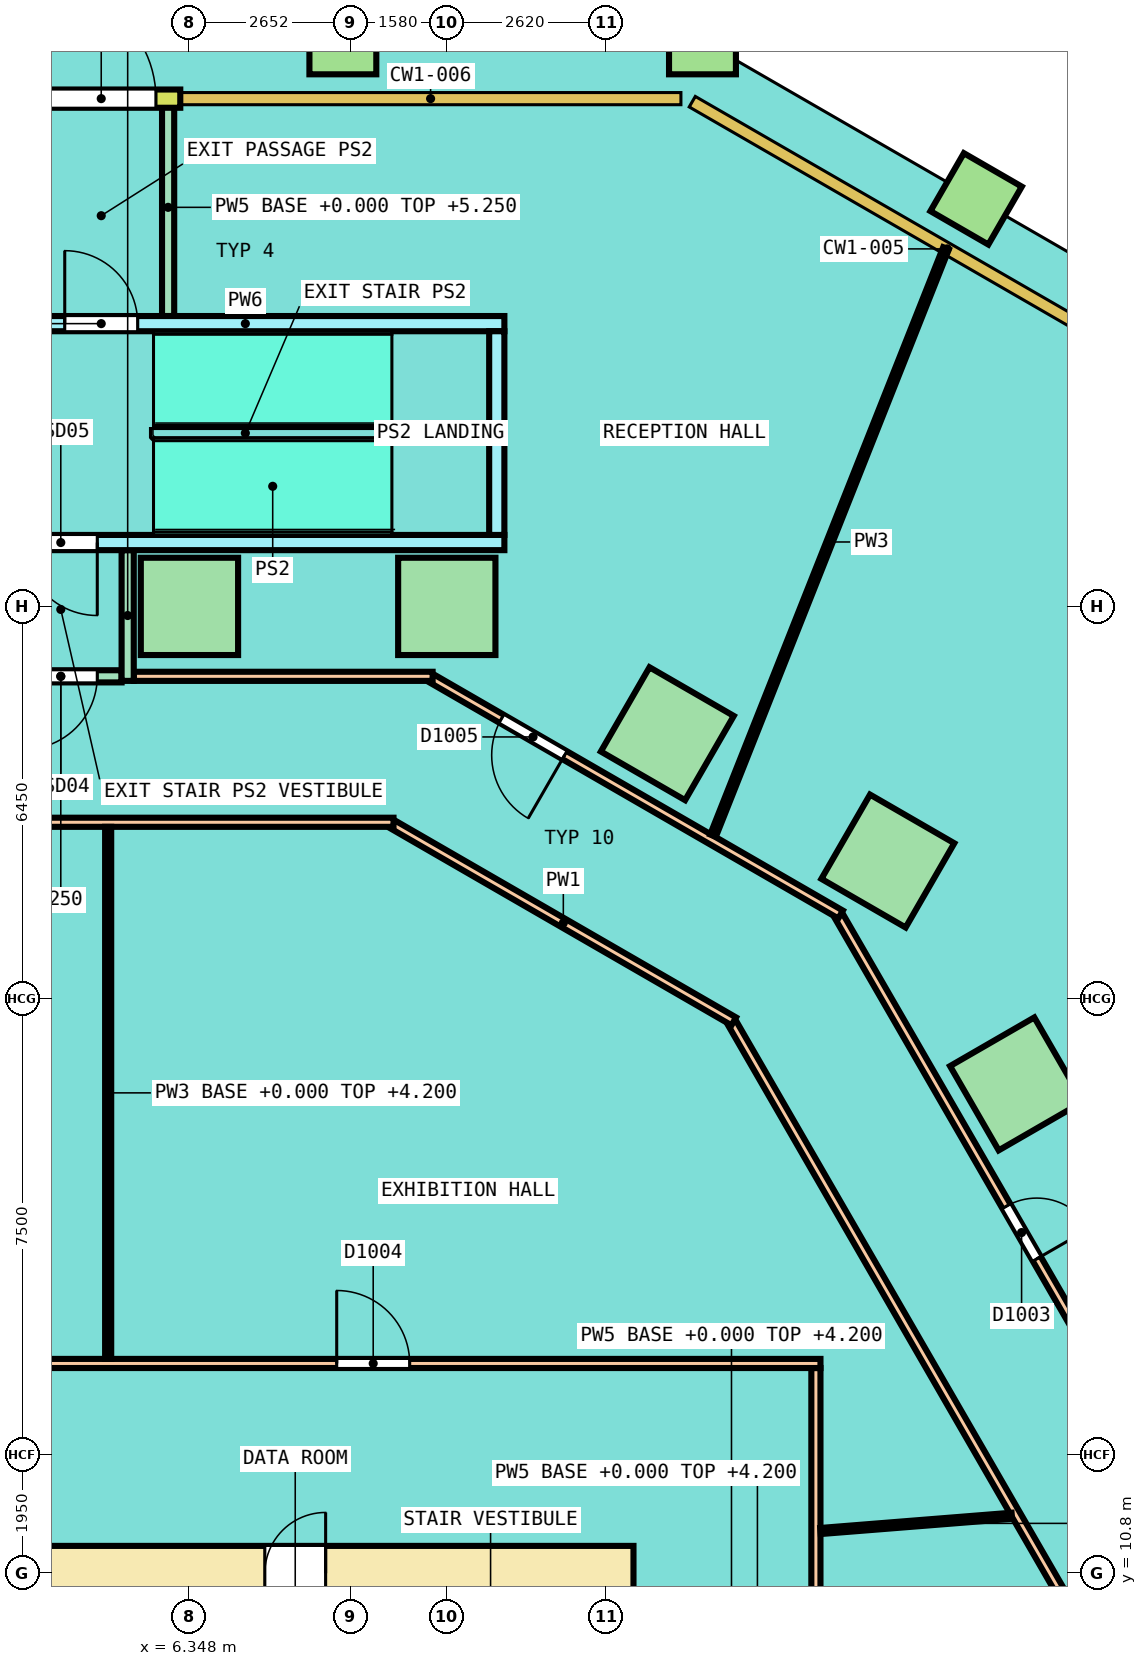
"""IFC4 building model, lengths in metres.
Left out: names, types, materials, properties, quantities, classifications, styles, units other than length and angle.
Written with IfcOpenShell. Run it as: python <this file> out.ifc"""

import sys

from ifc_helpers import new_model, si_unit, direction, frame, frame_2d, origin, origin_2d, place, context, subcontext, project, spatial, rectangle, extrude, element, fill, save


model = new_model("IFC4")
c1 = context("Model", 3, precision=1e-05, world=origin(), true_north=direction((0.0, 1.0)))
c2 = subcontext(c1, "Body", "Model", "MODEL_VIEW")
j1 = project(units=[si_unit("LENGTHUNIT", "METRE"), si_unit("PLANEANGLEUNIT", "RADIAN")], contexts=[c1])
p1 = place(None, origin())
s1 = spatial("IfcSite", under=j1, at=p1, CompositionType="ELEMENT")
p2 = place(p1, origin())
s2 = spatial("IfcBuilding", under=s1, at=p2, CompositionType="ELEMENT")
p3 = place(p2, origin())
s3 = spatial("IfcBuildingStorey", under=s2, at=p3, CompositionType="ELEMENT", Elevation=0.0)
for number, where, z_axis, x_axis in (
    (1, (19.949, 18.847, 0.0), (0.0, 0.0, 1.0), (-0.5, 0.866, 0.0)),
    (2, (17.833, 22.512, 0.0), (0.0, 0.0, 1.0), (-0.866, 0.5, 0.0)),
    (3, (14.206, 24.606, 0.0), (0.0, 0.0, 1.0), (-0.866, 0.5, 0.0)),
    (4, (10.58, 26.7, 0.0), (0.0, 0.0, 1.0), (-1.0, 0.0, 0.0)),
    (5, (6.348, 26.7, 0.0), (0.0, 0.0, 1.0), (-1.0, 0.0, 0.0)),
):
    element("IfcColumn", number, at=place(p3, frame(where, z_axis=z_axis, x_axis=x_axis)), inside=s3, PredefinedType="COLUMN", context=c2, shape_type="SweptSolid", body=[
        extrude(rectangle(XDim=1.6, YDim=1.6, at=origin_2d()), origin(), (0.0, 0.0, 1.0), 5.25),
    ])
for number, where, z_axis, x_axis in (
    (6, (19.285, 33.402, -0.35), (0.0, 0.0, 1.0), (-0.866, 0.5, 0.0)),
    (7, (14.785, 36.0, -0.35), (0.0, 0.0, 1.0), (-1.0, 0.0, 0.0)),
    (8, (8.871, 36.0, -0.35), (0.0, 0.0, 1.0), (-1.0, 0.0, 0.0)),
):
    element("IfcColumn", number, at=place(p3, frame(where, z_axis=z_axis, x_axis=x_axis)), inside=s3, PredefinedType="COLUMN", context=c2, shape_type="SweptSolid", body=[
        extrude(rectangle(XDim=1.1, YDim=1.1, at=origin_2d()), origin(), (0.0, 0.0, 1.0), 5.6),
    ])
p4 = place(p3, frame((6.197, 35.05, 0.0), z_axis=(0.0, 0.0, 1.0), x_axis=(-1.0, 0.0, 0.0)))
e9 = element("IfcWall", 9, at=p4, inside=s3, PredefinedType="SOLIDWALL", context=c2, shape_type="SweptSolid", body=[
    extrude(rectangle(XDim=2.6, YDim=0.3, at=frame_2d((1.3, 0.0))), origin(), (0.0, 0.0, 1.0), 5.25),
])
p5 = place(p4, frame((2.2, 0.0, 0.0), z_axis=(0.0, 0.0, 1.0), x_axis=(-1.0, 0.0, 0.0)))
e10 = element("IfcOpeningElement", 10, at=p5, cuts=e9, PredefinedType="OPENING", context=c2, shape_type="SweptSolid", body=[
    extrude(rectangle(XDim=1.8, YDim=2.4, at=frame_2d((0.9, 1.2))), frame((0.0, 0.16, 0.0), z_axis=(0.0, -1.0, 0.0), x_axis=(1.0, 0.0, 0.0)), (0.0, 0.0, 1.0), 0.32),
])
p6 = place(p3, frame((-13.65, 10.8, 0.0), z_axis=(0.0, 0.0, 1.0), x_axis=(1.0, 0.0, 0.0)))
e11 = element("IfcWall", 11, at=p6, inside=s3, PredefinedType="SHEAR", context=c2, shape_type="SweptSolid", body=[
    extrude(rectangle(XDim=27.3, YDim=0.9, at=frame_2d((13.65, 0.0))), origin(), (0.0, 0.0, 1.0), 5.3),
])
p7 = place(p6, frame((1.892, 0.0, 0.0)))
e12 = element("IfcOpeningElement", 12, at=p7, cuts=e11, PredefinedType="OPENING", context=c2, shape_type="SweptSolid", body=[
    extrude(rectangle(XDim=1.0, YDim=2.1, at=frame_2d((0.5, 1.05))), frame((0.0, 0.46, 0.0), z_axis=(0.0, -1.0, 0.0), x_axis=(1.0, 0.0, 0.0)), (0.0, 0.0, 1.0), 0.92),
])
p8 = place(p6, frame((4.97, 0.0, 0.0)))
e13 = element("IfcOpeningElement", 13, at=p8, cuts=e11, PredefinedType="OPENING", context=c2, shape_type="SweptSolid", body=[
    extrude(rectangle(XDim=1.0, YDim=2.1, at=frame_2d((0.5, 1.05))), frame((0.0, 0.46, 0.0), z_axis=(0.0, -1.0, 0.0), x_axis=(1.0, 0.0, 0.0)), (0.0, 0.0, 1.0), 0.92),
])
p9 = place(p6, frame((8.017, 0.0, 0.0)))
e14 = element("IfcOpeningElement", 14, at=p9, cuts=e11, PredefinedType="OPENING", context=c2, shape_type="SweptSolid", body=[
    extrude(rectangle(XDim=1.0, YDim=2.1, at=frame_2d((0.5, 1.05))), frame((0.0, 0.46, 0.0), z_axis=(0.0, -1.0, 0.0), x_axis=(1.0, 0.0, 0.0)), (0.0, 0.0, 1.0), 0.92),
])
p10 = place(p6, frame((11.064, 0.0, 0.0)))
e15 = element("IfcOpeningElement", 15, at=p10, cuts=e11, PredefinedType="OPENING", context=c2, shape_type="SweptSolid", body=[
    extrude(rectangle(XDim=1.0, YDim=2.1, at=frame_2d((0.5, 1.05))), frame((0.0, 0.46, 0.0), z_axis=(0.0, -1.0, 0.0), x_axis=(1.0, 0.0, 0.0)), (0.0, 0.0, 1.0), 0.92),
])
p11 = place(p6, frame((21.238, 0.0, 0.0)))
e16 = element("IfcOpeningElement", 16, at=p11, cuts=e11, PredefinedType="OPENING", context=c2, shape_type="SweptSolid", body=[
    extrude(rectangle(XDim=1.0, YDim=2.1, at=frame_2d((0.5, 1.05))), frame((0.0, 0.46, 0.0), z_axis=(0.0, -1.0, 0.0), x_axis=(1.0, 0.0, 0.0)), (0.0, 0.0, 1.0), 0.92),
])
p12 = place(p6, frame((14.575, 0.0, 0.0)))
e17 = element("IfcOpeningElement", 17, at=p12, cuts=e11, PredefinedType="OPENING", context=c2, shape_type="SweptSolid", body=[
    extrude(rectangle(XDim=1.4, YDim=2.1, at=frame_2d((0.7, 1.05))), frame((0.0, 0.46, 0.0), z_axis=(0.0, -1.0, 0.0), x_axis=(1.0, 0.0, 0.0)), (0.0, 0.0, 1.0), 0.92),
])
p13 = place(p3, frame((16.65, 7.5, 0.0), z_axis=(0.0, 0.0, 1.0), x_axis=(0.0, 1.0, 0.0)))
e18 = element("IfcWall", 18, at=p13, inside=s3, PredefinedType="PARTITIONING", context=c2, shape_type="SweptSolid", body=[
    extrude(rectangle(XDim=6.675, YDim=0.15, at=frame_2d((3.337, 0.0))), origin(), (0.0, 0.0, 1.0), 4.2),
])
p14 = place(p3, frame((-6.225, 14.25, 0.0), z_axis=(0.0, 0.0, 1.0), x_axis=(1.0, 0.0, 0.0)))
e19 = element("IfcWall", 19, at=p14, inside=s3, PredefinedType="PARTITIONING", context=c2, shape_type="SweptSolid", body=[
    extrude(rectangle(XDim=22.95, YDim=0.15, at=frame_2d((11.475, 0.0))), origin(), (0.0, 0.0, 1.0), 4.2),
])
p15 = place(p14, frame((14.995, 0.0, 0.0)))
e20 = element("IfcOpeningElement", 20, at=p15, cuts=e19, PredefinedType="OPENING", context=c2, shape_type="SweptSolid", body=[
    extrude(rectangle(XDim=1.2, YDim=2.1, at=frame_2d((0.6, 1.05))), frame((0.0, 0.085, 0.0), z_axis=(0.0, -1.0, 0.0), x_axis=(1.0, 0.0, 0.0)), (0.0, 0.0, 1.0), 0.17),
])
p16 = place(p14, frame((3.639, 0.0, 0.0)))
e21 = element("IfcOpeningElement", 21, at=p16, cuts=e19, PredefinedType="OPENING", context=c2, shape_type="SweptSolid", body=[
    extrude(rectangle(XDim=1.0, YDim=2.1, at=frame_2d((0.5, 1.05))), frame((0.0, 0.085, 0.0), z_axis=(0.0, -1.0, 0.0), x_axis=(1.0, 0.0, 0.0)), (0.0, 0.0, 1.0), 0.17),
])
p17 = place(p3, frame((17.029, 21.606, 0.0), z_axis=(0.0, 0.0, 1.0), x_axis=(0.499999139641, -0.866025900512, 0.0)))
e22 = element("IfcWall", 22, at=p17, inside=s3, PredefinedType="PARTITIONING", context=c2, shape_type="SweptSolid", body=[
    extrude(rectangle(XDim=20.394, YDim=0.15, at=frame_2d((10.197, 0.0))), origin(), (0.0, 0.0, 1.0), 4.2),
])
p18 = place(p17, frame((5.508, 0.0, 0.0)))
e23 = element("IfcOpeningElement", 23, at=p18, cuts=e22, PredefinedType="OPENING", context=c2, shape_type="SweptSolid", body=[
    extrude(rectangle(XDim=1.0, YDim=2.1, at=frame_2d((0.5, 1.05))), frame((0.0, 0.085, 0.0), z_axis=(0.0, -1.0, 0.0), x_axis=(1.0, 0.0, 0.0)), (0.0, 0.0, 1.0), 0.17),
])
p19 = place(p3, frame((15.272, 19.849, 0.0), z_axis=(0.0, 0.0, 1.0), x_axis=(0.499997883582, -0.866026625696, 0.0)))
e24 = element("IfcWall", 24, at=p19, inside=s3, PredefinedType="PARTITIONING", context=c2, shape_type="SweptSolid", body=[
    extrude(rectangle(XDim=19.182, YDim=0.15, at=frame_2d((9.591, 0.0))), origin(), (0.0, 0.0, 1.0), 4.2),
])
p20 = place(p19, frame((13.766, 0.0, 0.0)))
e25 = element("IfcOpeningElement", 25, at=p20, cuts=e24, PredefinedType="OPENING", context=c2, shape_type="SweptSolid", body=[
    extrude(rectangle(XDim=1.0, YDim=2.1, at=frame_2d((0.5, 1.05))), frame((0.0, 0.085, 0.0), z_axis=(0.0, -1.0, 0.0), x_axis=(1.0, 0.0, 0.0)), (0.0, 0.0, 1.0), 0.17),
])
p21 = place(p3, frame((10.337, 25.512, 0.0), z_axis=(0.0, 0.0, 1.0), x_axis=(0.866023143435, -0.50000391502, 0.0)))
e26 = element("IfcWall", 26, at=p21, inside=s3, PredefinedType="PARTITIONING", context=c2, shape_type="SweptSolid", body=[
    extrude(rectangle(XDim=7.759, YDim=0.15, at=frame_2d((3.879, 0.0))), origin(), (0.0, 0.0, 1.0), 4.2),
])
p22 = place(p21, frame((1.319, 0.0, 0.0)))
e27 = element("IfcOpeningElement", 27, at=p22, cuts=e26, PredefinedType="OPENING", context=c2, shape_type="SweptSolid", body=[
    extrude(rectangle(XDim=1.2, YDim=2.1, at=frame_2d((0.6, 1.05))), frame((0.0, 0.085, 0.0), z_axis=(0.0, -1.0, 0.0), x_axis=(1.0, 0.0, 0.0)), (0.0, 0.0, 1.0), 0.17),
])
p23 = place(p3, frame((9.694, 23.113, 0.0), z_axis=(0.0, 0.0, 1.0), x_axis=(0.866024786089, -0.500001069878, 0.0)))
e28 = element("IfcWall", 28, at=p23, inside=s3, PredefinedType="PARTITIONING", context=c2, shape_type="SweptSolid", body=[
    extrude(rectangle(XDim=6.473, YDim=0.15, at=frame_2d((3.236, 0.0))), origin(), (0.0, 0.0, 1.0), 4.2),
])
p24 = place(p3, frame((-6.225, 23.15, 0.0), z_axis=(0.0, 0.0, 1.0), x_axis=(1.0, 0.0, 0.0)))
e29 = element("IfcWall", 29, at=p24, inside=s3, PredefinedType="PARTITIONING", context=c2, shape_type="SweptSolid", body=[
    extrude(rectangle(XDim=15.929, YDim=0.15, at=frame_2d((7.964, 0.0))), origin(), (0.0, 0.0, 1.0), 4.2),
])
p25 = place(p3, frame((5.432, 25.55, 0.0), z_axis=(0.0, 0.0, 1.0), x_axis=(1.0, 0.0, 0.0)))
e30 = element("IfcWall", 30, at=p25, inside=s3, PredefinedType="PARTITIONING", context=c2, shape_type="SweptSolid", body=[
    extrude(rectangle(XDim=4.915, YDim=0.15, at=frame_2d((2.458, 0.0))), origin(), (0.0, 0.0, 1.0), 4.2),
])
p26 = place(p3, frame((3.232, 25.55, 0.0), z_axis=(0.0, 0.0, 1.0), x_axis=(1.0, 0.0, 0.0)))
e31 = element("IfcWall", 31, at=p26, inside=s3, PredefinedType="PARTITIONING", context=c2, shape_type="SweptSolid", body=[
    extrude(rectangle(XDim=2.0, YDim=0.2, at=frame_2d((1.0, 0.0))), origin(), (0.0, 0.0, 1.0), 5.25),
])
p27 = place(p26, frame((0.4, 0.0, 0.0)))
e32 = element("IfcOpeningElement", 32, at=p27, cuts=e31, PredefinedType="OPENING", context=c2, shape_type="SweptSolid", body=[
    extrude(rectangle(XDim=1.2, YDim=2.1, at=frame_2d((0.6, 1.05))), frame((0.0, 0.11, 0.0), z_axis=(0.0, -1.0, 0.0), x_axis=(1.0, 0.0, 0.0)), (0.0, 0.0, 1.0), 0.22),
])
p28 = place(p3, frame((5.332, 25.475, 0.0), z_axis=(0.0, 0.0, 1.0), x_axis=(0.0, 1.0, 0.0)))
e33 = element("IfcWall", 33, at=p28, inside=s3, PredefinedType="PARTITIONING", context=c2, shape_type="SweptSolid", body=[
    extrude(rectangle(XDim=2.15, YDim=0.2, at=frame_2d((1.075, 0.0))), origin(), (0.0, 0.0, 1.0), 4.35),
])
p29 = place(p3, frame((5.997, 31.475, 0.0), z_axis=(0.0, 0.0, 1.0), x_axis=(0.0, 1.0, 0.0)))
e34 = element("IfcWall", 34, at=p29, inside=s3, PredefinedType="PARTITIONING", context=c2, shape_type="SweptSolid", body=[
    extrude(rectangle(XDim=3.575, YDim=0.2, at=frame_2d((1.788, 0.0))), origin(), (0.0, 0.0, 1.0), 5.25),
])
p30 = place(p3, frame((16.725, 11.495, 0.0), z_axis=(0.0, 0.0, 1.0), x_axis=(0.996841045422, 0.079422478949, 0.0)))
e35 = element("IfcWall", 35, at=p30, inside=s3, PredefinedType="PARTITIONING", context=c2, shape_type="SweptSolid", body=[
    extrude(rectangle(XDim=3.157, YDim=0.1, at=frame_2d((1.579, 0.0))), origin(), (0.0, 0.0, 1.0), 4.2),
])
p31 = place(p3, frame((14.958, 22.93, 0.0), z_axis=(0.0, 0.0, 1.0), x_axis=(0.368760134438, 0.929524589911, 0.0)))
e36 = element("IfcWall", 36, at=p31, inside=s3, PredefinedType="PARTITIONING", context=c2, shape_type="SweptSolid", body=[
    extrude(rectangle(XDim=10.391, YDim=0.1, at=frame_2d((5.196, 0.0))), origin(), (0.0, 0.0, 1.0), 4.35),
])
p32 = place(p3, frame((5.011, 14.325, 0.0), z_axis=(0.0, 0.0, 1.0), x_axis=(0.0, 1.0, 0.0)))
e37 = element("IfcWall", 37, at=p32, inside=s3, PredefinedType="PARTITIONING", context=c2, shape_type="SweptSolid", body=[
    extrude(rectangle(XDim=8.75, YDim=0.1, at=frame_2d((4.375, 0.0))), origin(), (0.0, 0.0, 1.0), 4.2),
])
p33 = place(p3, frame((3.007, 31.35, 0.0), z_axis=(0.0, 0.0, 1.0), x_axis=(1.0, 0.0, 0.0)))
e38 = element("IfcWall", 38, at=p33, inside=s3, PredefinedType="SOLIDWALL", context=c2, shape_type="SweptSolid", body=[
    extrude(rectangle(XDim=8.52, YDim=0.25, at=frame_2d((4.26, 0.0))), origin(), (0.0, 0.0, 1.0), 5.25),
])
p34 = place(p33, frame((1.29, 0.0, 0.0)))
e39 = element("IfcOpeningElement", 39, at=p34, cuts=e38, PredefinedType="OPENING", context=c2, shape_type="SweptSolid", body=[
    extrude(rectangle(XDim=1.2, YDim=2.1, at=frame_2d((0.6, 1.05))), frame((0.0, 0.135, 0.0), z_axis=(0.0, -1.0, 0.0), x_axis=(1.0, 0.0, 0.0)), (0.0, 0.0, 1.0), 0.27),
])
p35 = place(p3, frame((3.032, 27.75, 0.0), z_axis=(0.0, 0.0, 1.0), x_axis=(1.0, 0.0, 0.0)))
e40 = element("IfcWall", 40, at=p35, inside=s3, PredefinedType="SOLIDWALL", context=c2, shape_type="SweptSolid", body=[
    extrude(rectangle(XDim=8.495, YDim=0.25, at=frame_2d((4.248, 0.0))), origin(), (0.0, 0.0, 1.0), 5.25),
])
p36 = place(p35, frame((0.6, 0.0, 0.0)))
e41 = element("IfcOpeningElement", 41, at=p36, cuts=e40, PredefinedType="OPENING", context=c2, shape_type="SweptSolid", body=[
    extrude(rectangle(XDim=1.2, YDim=2.1, at=frame_2d((0.6, 1.05))), frame((0.0, 0.135, 0.0), z_axis=(0.0, -1.0, 0.0), x_axis=(1.0, 0.0, 0.0)), (0.0, 0.0, 1.0), 0.27),
])
p37 = place(p3, frame((11.402, 27.875, 0.0), z_axis=(0.0, 0.0, 1.0), x_axis=(0.0, 1.0, 0.0)))
e42 = element("IfcWall", 42, at=p37, inside=s3, PredefinedType="SOLIDWALL", context=c2, shape_type="SweptSolid", body=[
    extrude(rectangle(XDim=3.35, YDim=0.25, at=frame_2d((1.675, 0.0))), origin(), (0.0, 0.0, 1.0), 5.25),
])
p38 = place(p5, origin())
e43 = element("IfcDoor", 43, at=p38, inside=s3, OperationType="DOUBLE_DOOR_SINGLE_SWING", PredefinedType="DOOR", context=c2, shape_type="SweptSolid", body=[
    extrude(rectangle(XDim=1.8, YDim=2.4, at=frame_2d((0.9, 1.2))), frame((0.0, 0.025, 0.0), z_axis=(0.0, -1.0, 0.0), x_axis=(1.0, 0.0, 0.0)), (0.0, 0.0, 1.0), 0.05),
])
fill(e10, e43)
p39 = place(p11, origin())
e44 = element("IfcDoor", 44, at=p39, inside=s3, OperationType="SINGLE_SWING_RIGHT", PredefinedType="DOOR", context=c2, shape_type="SweptSolid", body=[
    extrude(rectangle(XDim=1.0, YDim=2.1, at=frame_2d((0.5, 1.05))), frame((0.0, 0.3, 0.0), z_axis=(0.0, -1.0, 0.0), x_axis=(1.0, 0.0, 0.0)), (0.0, 0.0, 1.0), 0.6),
])
fill(e16, e44)
p40 = place(p18, origin())
e45 = element("IfcDoor", 45, at=p40, inside=s3, OperationType="SINGLE_SWING_RIGHT", PredefinedType="DOOR", context=c2, shape_type="SweptSolid", body=[
    extrude(rectangle(XDim=1.0, YDim=2.1, at=frame_2d((0.5, 1.05))), frame((0.0, 0.025, 0.0), z_axis=(0.0, -1.0, 0.0), x_axis=(1.0, 0.0, 0.0)), (0.0, 0.0, 1.0), 0.05),
])
fill(e23, e45)
p41 = place(p15, origin())
e46 = element("IfcDoor", 46, at=p41, inside=s3, OperationType="DOUBLE_DOOR_SINGLE_SWING", PredefinedType="DOOR", context=c2, shape_type="SweptSolid", body=[
    extrude(rectangle(XDim=1.2, YDim=2.1, at=frame_2d((0.6, 1.05))), frame((0.0, 0.025, 0.0), z_axis=(0.0, -1.0, 0.0), x_axis=(1.0, 0.0, 0.0)), (0.0, 0.0, 1.0), 0.05),
])
fill(e20, e46)
p42 = place(p22, origin())
e47 = element("IfcDoor", 47, at=p42, inside=s3, OperationType="DOUBLE_DOOR_SINGLE_SWING", PredefinedType="DOOR", context=c2, shape_type="SweptSolid", body=[
    extrude(rectangle(XDim=1.2, YDim=2.1, at=frame_2d((0.6, 1.05))), frame((0.0, 0.025, 0.0), z_axis=(0.0, -1.0, 0.0), x_axis=(1.0, 0.0, 0.0)), (0.0, 0.0, 1.0), 0.05),
])
fill(e27, e47)
p43 = place(p27, origin())
e48 = element("IfcDoor", 48, at=p43, inside=s3, OperationType="SINGLE_SWING_LEFT", PredefinedType="DOOR", context=c2, shape_type="SweptSolid", body=[
    extrude(rectangle(XDim=1.2, YDim=2.1, at=frame_2d((0.6, 1.05))), frame((0.0, 0.025, 0.0), z_axis=(0.0, -1.0, 0.0), x_axis=(1.0, 0.0, 0.0)), (0.0, 0.0, 1.0), 0.05),
])
fill(e32, e48)
p44 = place(p36, origin())
e49 = element("IfcDoor", 49, at=p44, inside=s3, OperationType="SINGLE_SWING_RIGHT", PredefinedType="DOOR", context=c2, shape_type="SweptSolid", body=[
    extrude(rectangle(XDim=1.2, YDim=2.1, at=frame_2d((0.6, 1.05))), frame((0.0, 0.025, 0.0), z_axis=(0.0, -1.0, 0.0), x_axis=(1.0, 0.0, 0.0)), (0.0, 0.0, 1.0), 0.05),
])
fill(e41, e49)
p45 = place(p34, origin())
e50 = element("IfcDoor", 50, at=p45, inside=s3, OperationType="SINGLE_SWING_LEFT", PredefinedType="DOOR", context=c2, shape_type="SweptSolid", body=[
    extrude(rectangle(XDim=1.2, YDim=2.1, at=frame_2d((0.6, 1.05))), frame((0.0, 0.025, 0.0), z_axis=(0.0, -1.0, 0.0), x_axis=(1.0, 0.0, 0.0)), (0.0, 0.0, 1.0), 0.05),
])
fill(e39, e50)
save(model, sys.argv[1])
